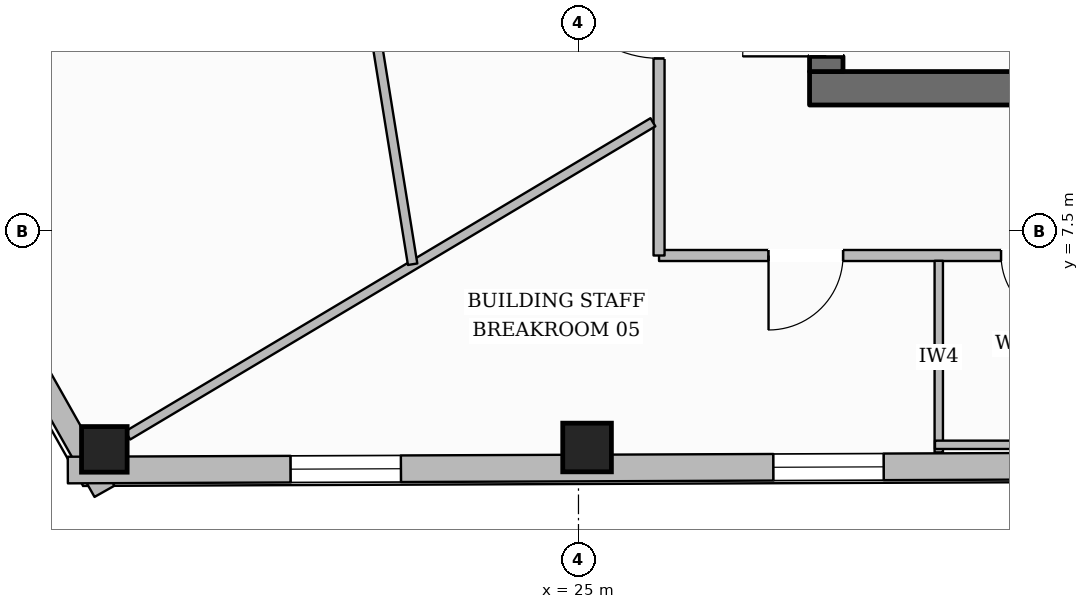
"""IFC4 building model, lengths in metres.
Left out: names, types, materials, properties, quantities, classifications, styles, units other than length and angle.
Written with IfcOpenShell. Run it as: python <this file> out.ifc"""

import sys

from ifc_helpers import new_model, si_unit, direction, frame, frame_2d, origin, origin_2d, place, context, subcontext, project, spatial, rectangle, hollow_rectangle, extrude, element, fill, save


model = new_model("IFC4")
c1 = context("Model", 3, precision=1e-05, world=origin(), true_north=direction((0.0, 1.0)))
c2 = subcontext(c1, "Body", "Model", "MODEL_VIEW")
j1 = project(units=[si_unit("LENGTHUNIT", "METRE"), si_unit("PLANEANGLEUNIT", "RADIAN")], contexts=[c1])
p1 = place(None, origin())
s1 = spatial("IfcSite", under=j1, at=p1, CompositionType="ELEMENT")
p2 = place(p1, origin())
s2 = spatial("IfcBuilding", under=s1, at=p2, CompositionType="ELEMENT")
p3 = place(p2, frame((0.0, 0.0, 230.45)))
s3 = spatial("IfcBuildingStorey", under=s2, at=p3, CompositionType="ELEMENT", Elevation=230.45)
p4 = place(p3, frame((28.04, 9.38, 0.0), z_axis=(0.0, 0.0, 1.0), x_axis=(1.0, 0.0, 0.0)))
e1 = element("IfcWall", 1, at=p4, inside=s3, PredefinedType="SOLIDWALL", context=c2, shape_type="SweptSolid", body=[
    extrude(rectangle(XDim=19.92, YDim=0.44, at=frame_2d((9.96, 0.0))), origin(), (0.0, 0.0, 1.0), 3.43),
])
p5 = place(p4, frame((10.46, 0.0, 0.0)))
e2 = element("IfcOpeningElement", 2, at=p5, cuts=e1, PredefinedType="OPENING", context=c2, shape_type="SweptSolid", body=[
    extrude(rectangle(XDim=1.4, YDim=2.2, at=frame_2d((0.7, 1.1))), frame((0.0, 0.23, 0.0), z_axis=(0.0, -1.0, 0.0), x_axis=(1.0, 0.0, 0.0)), (0.0, 0.0, 1.0), 0.46),
])
p6 = place(p3, frame((28.26, 9.6, 0.0), z_axis=(0.0, 0.0, 1.0), x_axis=(0.0, 1.0, 0.0)))
e3 = element("IfcWall", 3, at=p6, inside=s3, PredefinedType="SOLIDWALL", context=c2, shape_type="SweptSolid", body=[
    extrude(rectangle(XDim=13.0, YDim=0.44, at=frame_2d((6.5, 0.0))), origin(), (0.0, 0.0, 1.0), 3.43),
])
p7 = place(p6, frame((0.2, 0.0, 0.0)))
e4 = element("IfcOpeningElement", 4, at=p7, cuts=e3, PredefinedType="OPENING", context=c2, shape_type="SweptSolid", body=[
    extrude(rectangle(XDim=1.1, YDim=2.15, at=frame_2d((0.55, 1.075))), frame((0.0, 0.23, 0.0), z_axis=(0.0, -1.0, 0.0), x_axis=(1.0, 0.0, 0.0)), (0.0, 0.0, 1.0), 0.46),
])
p8 = place(p6, frame((8.4, 0.0, 0.0)))
e5 = element("IfcOpeningElement", 5, at=p8, cuts=e3, PredefinedType="OPENING", context=c2, shape_type="SweptSolid", body=[
    extrude(rectangle(XDim=0.9, YDim=2.1, at=frame_2d((0.45, 1.05))), frame((0.0, 0.23, 0.0), z_axis=(0.0, -1.0, 0.0), x_axis=(1.0, 0.0, 0.0)), (0.0, 0.0, 1.0), 0.46),
])
p9 = place(p3, frame((18.762, 4.629, 0.0), z_axis=(0.0, 0.0, 1.0), x_axis=(1.0, 0.0, 0.0)))
e6 = element("IfcColumn", 6, at=p9, inside=s3, PredefinedType="COLUMN", context=c2, shape_type="SweptSolid", body=[
    extrude(hollow_rectangle(XDim=0.6, YDim=0.6, WallThickness=0.028, at=origin_2d()), origin(), (0.0, 0.0, 1.0), 3.43),
])
p10 = place(p3, frame((25.113, 4.654, 0.0), z_axis=(0.0, 0.0, 1.0), x_axis=(1.0, 0.0, 0.0)))
e7 = element("IfcColumn", 7, at=p10, inside=s3, PredefinedType="COLUMN", context=c2, shape_type="SweptSolid", body=[
    extrude(hollow_rectangle(XDim=0.64, YDim=0.64, WallThickness=0.028, at=origin_2d()), origin(), (0.0, 0.0, 1.0), 3.43),
])
p11 = place(p3, frame((18.764, 4.077, 0.0), z_axis=(0.0, 0.0, 1.0), x_axis=(-0.491297103915, 0.870992052595, 0.0)))
e8 = element("IfcWall", 8, at=p11, inside=s3, PredefinedType="STANDARD", context=c2, shape_type="SweptSolid", body=[
    extrude(rectangle(XDim=8.479, YDim=0.3, at=frame_2d((4.24, 0.0))), origin(), (0.0, 0.0, 1.0), 2.962),
])
p12 = place(p11, frame((3.715, 0.0, 0.65)))
e9 = element("IfcOpeningElement", 9, at=p12, cuts=e8, PredefinedType="OPENING", context=c2, shape_type="SweptSolid", body=[
    extrude(rectangle(XDim=1.05, YDim=1.55, at=frame_2d((0.525, 0.775))), frame((0.0, 0.16, 0.0), z_axis=(0.0, -1.0, 0.0), x_axis=(1.0, 0.0, 0.0)), (0.0, 0.0, 1.0), 0.32),
])
p13 = place(p3, frame((57.346, 4.51, 0.0), z_axis=(0.0, 0.0, 1.0), x_axis=(-0.999992347121, -0.003912249994, 0.0)))
e10 = element("IfcWall", 10, at=p13, inside=s3, PredefinedType="STANDARD", context=c2, shape_type="SweptSolid", body=[
    extrude(rectangle(XDim=39.065, YDim=0.35, at=frame_2d((19.532, 0.0))), origin(), (0.0, 0.0, 1.0), 2.962),
])
p14 = place(p13, frame((9.366, 0.0, 0.0)))
e11 = element("IfcOpeningElement", 11, at=p14, cuts=e10, PredefinedType="OPENING", context=c2, shape_type="SweptSolid", body=[
    extrude(rectangle(XDim=1.0, YDim=2.2, at=frame_2d((0.5, 1.1))), frame((0.0, 0.185, 0.0), z_axis=(0.0, -1.0, 0.0), x_axis=(1.0, 0.0, 0.0)), (0.0, 0.0, 1.0), 0.37),
])
p15 = place(p13, frame((34.683, 0.0, 0.55)))
e12 = element("IfcOpeningElement", 12, at=p15, cuts=e10, PredefinedType="OPENING", context=c2, shape_type="SweptSolid", body=[
    extrude(rectangle(XDim=1.45, YDim=1.6, at=frame_2d((0.725, 0.8))), frame((0.0, 0.185, 0.0), z_axis=(0.0, -1.0, 0.0), x_axis=(1.0, 0.0, 0.0)), (0.0, 0.0, 1.0), 0.37),
])
p16 = place(p13, frame((28.332, 0.0, 0.55)))
e13 = element("IfcOpeningElement", 13, at=p16, cuts=e10, PredefinedType="OPENING", context=c2, shape_type="SweptSolid", body=[
    extrude(rectangle(XDim=1.45, YDim=1.6, at=frame_2d((0.725, 0.8))), frame((0.0, 0.185, 0.0), z_axis=(0.0, -1.0, 0.0), x_axis=(1.0, 0.0, 0.0)), (0.0, 0.0, 1.0), 0.37),
])
p17 = place(p13, frame((21.981, 0.0, 0.55)))
e14 = element("IfcOpeningElement", 14, at=p17, cuts=e10, PredefinedType="OPENING", context=c2, shape_type="SweptSolid", body=[
    extrude(rectangle(XDim=1.45, YDim=1.6, at=frame_2d((0.725, 0.8))), frame((0.0, 0.185, 0.0), z_axis=(0.0, -1.0, 0.0), x_axis=(1.0, 0.0, 0.0)), (0.0, 0.0, 1.0), 0.37),
])
p18 = place(p13, frame((2.928, 0.0, 0.55)))
e15 = element("IfcOpeningElement", 15, at=p18, cuts=e10, PredefinedType="OPENING", context=c2, shape_type="SweptSolid", body=[
    extrude(rectangle(XDim=1.45, YDim=1.6, at=frame_2d((0.725, 0.8))), frame((0.0, 0.185, 0.0), z_axis=(0.0, -1.0, 0.0), x_axis=(1.0, 0.0, 0.0)), (0.0, 0.0, 1.0), 0.37),
])
p19 = place(p3, frame((49.94, 7.18, 0.0), z_axis=(0.0, 0.0, 1.0), x_axis=(-1.0, 0.0, 0.0)))
e16 = element("IfcWall", 16, at=p19, inside=s3, PredefinedType="PARTITIONING", context=c2, shape_type="SweptSolid", body=[
    extrude(rectangle(XDim=23.88, YDim=0.145, at=frame_2d((11.94, 0.0))), origin(), (0.0, 0.0, 1.0), 3.169),
])
p20 = place(p19, frame((18.5, 0.0, 0.0)))
e17 = element("IfcOpeningElement", 17, at=p20, cuts=e16, PredefinedType="OPENING", context=c2, shape_type="SweptSolid", body=[
    extrude(rectangle(XDim=0.88, YDim=2.1, at=frame_2d((0.44, 1.05))), frame((0.0, 0.083, 0.0), z_axis=(0.0, -1.0, 0.0), x_axis=(1.0, 0.0, 0.0)), (0.0, 0.0, 1.0), 0.165),
])
p21 = place(p19, frame((15.98, 0.0, 0.0)))
e18 = element("IfcOpeningElement", 18, at=p21, cuts=e16, PredefinedType="OPENING", context=c2, shape_type="SweptSolid", body=[
    extrude(rectangle(XDim=0.88, YDim=2.1, at=frame_2d((0.44, 1.05))), frame((0.0, 0.083, 0.0), z_axis=(0.0, -1.0, 0.0), x_axis=(1.0, 0.0, 0.0)), (0.0, 0.0, 1.0), 0.165),
])
p22 = place(p19, frame((13.52, 0.0, 0.0)))
e19 = element("IfcOpeningElement", 19, at=p22, cuts=e16, PredefinedType="OPENING", context=c2, shape_type="SweptSolid", body=[
    extrude(rectangle(XDim=0.96, YDim=2.1, at=frame_2d((0.48, 1.05))), frame((0.0, 0.083, 0.0), z_axis=(0.0, -1.0, 0.0), x_axis=(1.0, 0.0, 0.0)), (0.0, 0.0, 1.0), 0.165),
])
p23 = place(p19, frame((21.459, 0.0, 0.0)))
e20 = element("IfcOpeningElement", 20, at=p23, cuts=e16, PredefinedType="OPENING", context=c2, shape_type="SweptSolid", body=[
    extrude(rectangle(XDim=0.98, YDim=2.15, at=frame_2d((0.49, 1.075))), frame((0.0, 0.083, 0.0), z_axis=(0.0, -1.0, 0.0), x_axis=(1.0, 0.0, 0.0)), (0.0, 0.0, 1.0), 0.165),
])
p24 = place(p19, frame((6.99, 0.0, 0.0)))
e21 = element("IfcOpeningElement", 21, at=p24, cuts=e16, PredefinedType="OPENING", context=c2, shape_type="SweptSolid", body=[
    extrude(rectangle(XDim=0.98, YDim=2.15, at=frame_2d((0.49, 1.075))), frame((0.0, 0.083, 0.0), z_axis=(0.0, -1.0, 0.0), x_axis=(1.0, 0.0, 0.0)), (0.0, 0.0, 1.0), 0.165),
])
p25 = place(p3, frame((26.06, 7.18, 0.0), z_axis=(0.0, 0.0, 1.0), x_axis=(0.0, 1.0, 0.0)))
e22 = element("IfcWall", 22, at=p25, inside=s3, PredefinedType="PARTITIONING", context=c2, shape_type="SweptSolid", body=[
    extrude(rectangle(XDim=4.97, YDim=0.145, at=frame_2d((2.485, 0.0))), origin(), (0.0, 0.0, 1.0), 3.43),
])
p26 = place(p25, frame((2.594, 0.0, 0.0)))
e23 = element("IfcOpeningElement", 23, at=p26, cuts=e22, PredefinedType="OPENING", context=c2, shape_type="SweptSolid", body=[
    extrude(rectangle(XDim=1.4, YDim=2.2, at=frame_2d((0.7, 1.1))), frame((0.0, 0.083, 0.0), z_axis=(0.0, -1.0, 0.0), x_axis=(1.0, 0.0, 0.0)), (0.0, 0.0, 1.0), 0.165),
])
p27 = place(p3, frame((29.74, 4.589, 0.0), z_axis=(0.0, 0.0, 1.0), x_axis=(0.0, 1.0, 0.0)))
e24 = element("IfcWall", 24, at=p27, inside=s3, PredefinedType="PLUMBINGWALL", context=c2, shape_type="SweptSolid", body=[
    extrude(rectangle(XDim=2.521, YDim=0.11, at=frame_2d((1.26, 0.0))), origin(), (0.0, 0.0, 1.0), 3.43),
])
p28 = place(p3, frame((29.69, 4.689, 0.0), z_axis=(0.0, 0.0, 1.0), x_axis=(1.0, 0.0, 0.0)))
e25 = element("IfcWall", 25, at=p28, inside=s3, PredefinedType="PLUMBINGWALL", context=c2, shape_type="SweptSolid", body=[
    extrude(rectangle(XDim=7.46, YDim=0.11, at=frame_2d((3.73, 0.0))), origin(), (0.0, 0.0, 1.0), 2.965),
])
p29 = place(p3, frame((25.979, 8.933, 0.0), z_axis=(0.0, 0.0, 1.0), x_axis=(-0.858895628023, -0.512150661586, 0.0)))
e26 = element("IfcWall", 26, at=p29, inside=s3, PredefinedType="PARTITIONING", context=c2, shape_type="SweptSolid", body=[
    extrude(rectangle(XDim=8.044, YDim=0.125, at=frame_2d((4.022, 0.0))), origin(), (0.0, 0.0, 1.0), 2.971),
])
p30 = place(p3, frame((20.561, 21.082, 0.0), z_axis=(0.0, 0.0, 1.0), x_axis=(0.158981027385, -0.987281638101, 0.0)))
e27 = element("IfcWall", 27, at=p30, inside=s3, PredefinedType="PARTITIONING", context=c2, shape_type="SweptSolid", body=[
    extrude(rectangle(XDim=14.197, YDim=0.125, at=frame_2d((7.099, 0.0))), origin(), (0.0, 0.0, 1.0), 3.169),
])
p31 = place(p30, frame((6.497, 0.0, 0.0)))
e28 = element("IfcOpeningElement", 28, at=p31, cuts=e27, PredefinedType="OPENING", context=c2, shape_type="SweptSolid", body=[
    extrude(rectangle(XDim=0.98, YDim=2.15, at=frame_2d((0.49, 1.075))), frame((0.0, 0.073, 0.0), z_axis=(0.0, -1.0, 0.0), x_axis=(1.0, 0.0, 0.0)), (0.0, 0.0, 1.0), 0.145),
])
p32 = place(p15, origin())
e29 = element("IfcWindow", 29, at=p32, inside=s3, PartitioningType="SINGLE_PANEL", PredefinedType="WINDOW", context=c2, shape_type="SweptSolid", body=[
    extrude(rectangle(XDim=1.45, YDim=1.6, at=frame_2d((0.725, 0.8))), frame((0.0, 0.03, 0.0), z_axis=(0.0, -1.0, 0.0), x_axis=(1.0, 0.0, 0.0)), (0.0, 0.0, 1.0), 0.06),
])
fill(e12, e29)
p33 = place(p16, origin())
e30 = element("IfcWindow", 30, at=p33, inside=s3, PartitioningType="SINGLE_PANEL", PredefinedType="WINDOW", context=c2, shape_type="SweptSolid", body=[
    extrude(rectangle(XDim=1.45, YDim=1.6, at=frame_2d((0.725, 0.8))), frame((0.0, 0.03, 0.0), z_axis=(0.0, -1.0, 0.0), x_axis=(1.0, 0.0, 0.0)), (0.0, 0.0, 1.0), 0.06),
])
fill(e13, e30)
p34 = place(p7, origin())
e31 = element("IfcDoor", 31, at=p34, inside=s3, OperationType="SINGLE_SWING_LEFT", PredefinedType="DOOR", context=c2, shape_type="SweptSolid", body=[
    extrude(rectangle(XDim=1.1, YDim=2.15, at=frame_2d((0.55, 1.075))), frame((0.0, 0.025, 0.0), z_axis=(0.0, -1.0, 0.0), x_axis=(1.0, 0.0, 0.0)), (0.0, 0.0, 1.0), 0.05),
])
fill(e4, e31)
p35 = place(p20, origin())
e32 = element("IfcDoor", 32, at=p35, inside=s3, OperationType="SINGLE_SWING_LEFT", PredefinedType="DOOR", context=c2, shape_type="SweptSolid", body=[
    extrude(rectangle(XDim=0.88, YDim=2.1, at=frame_2d((0.44, 1.05))), frame((0.0, 0.025, 0.0), z_axis=(0.0, -1.0, 0.0), x_axis=(1.0, 0.0, 0.0)), (0.0, 0.0, 1.0), 0.05),
])
fill(e17, e32)
p36 = place(p26, origin())
e33 = element("IfcDoor", 33, at=p36, inside=s3, OperationType="SINGLE_SWING_RIGHT", PredefinedType="DOOR", context=c2, shape_type="SweptSolid", body=[
    extrude(rectangle(XDim=1.4, YDim=2.2, at=frame_2d((0.7, 1.1))), frame((0.0, 0.025, 0.0), z_axis=(0.0, -1.0, 0.0), x_axis=(1.0, 0.0, 0.0)), (0.0, 0.0, 1.0), 0.05),
])
fill(e23, e33)
p37 = place(p23, origin())
e34 = element("IfcDoor", 34, at=p37, inside=s3, OperationType="SINGLE_SWING_RIGHT", PredefinedType="DOOR", context=c2, shape_type="SweptSolid", body=[
    extrude(rectangle(XDim=0.98, YDim=2.15, at=frame_2d((0.49, 1.075))), frame((0.0, 0.025, 0.0), z_axis=(0.0, -1.0, 0.0), x_axis=(1.0, 0.0, 0.0)), (0.0, 0.0, 1.0), 0.05),
])
fill(e20, e34)
save(model, sys.argv[1])
